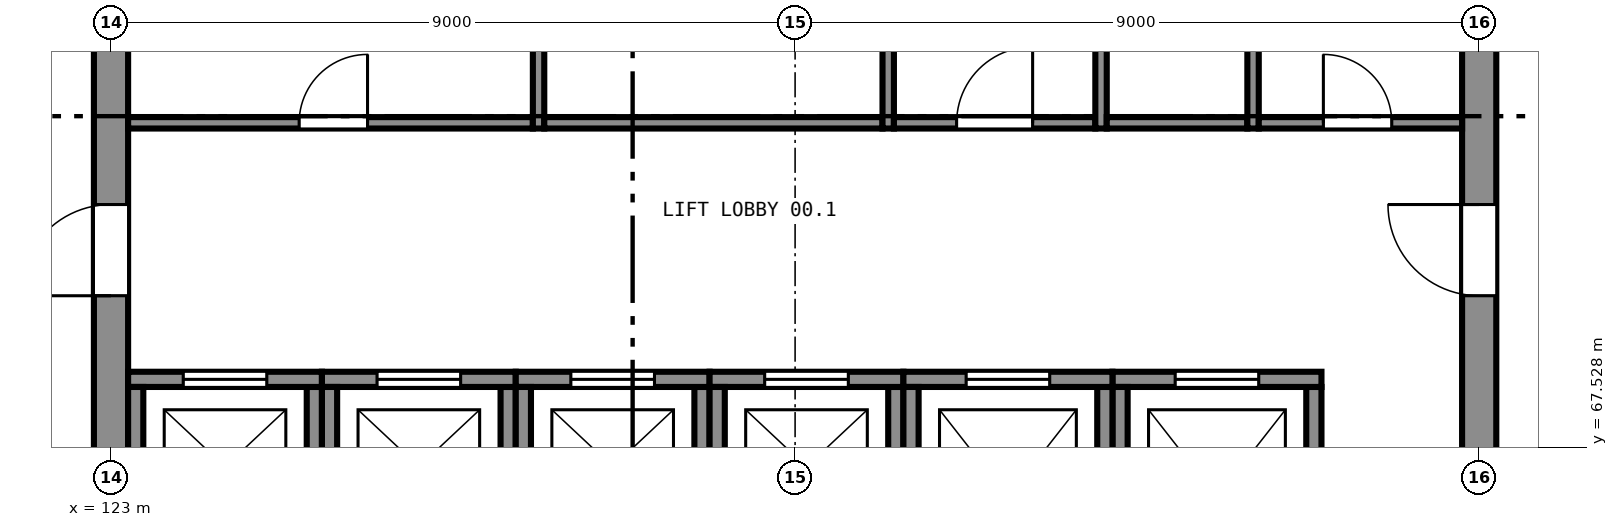
"""IFC4 building model, lengths in metres.
Left out: names, types, materials, properties, quantities, classifications, styles, units other than length and angle.
Written with IfcOpenShell. Run it as: python <this file> out.ifc"""

import sys

from ifc_helpers import new_model, si_unit, direction, frame, frame_2d, origin, place, context, subcontext, project, spatial, rectangle, extrude, element, fill, save


model = new_model("IFC4")
c1 = context("Model", 3, precision=1e-05, world=origin(), true_north=direction((0.0, 1.0)))
c2 = subcontext(c1, "Body", "Model", "MODEL_VIEW")
j1 = project(units=[si_unit("LENGTHUNIT", "METRE"), si_unit("PLANEANGLEUNIT", "RADIAN")], contexts=[c1])
p1 = place(None, origin())
s1 = spatial("IfcSite", under=j1, at=p1, CompositionType="ELEMENT")
p2 = place(p1, origin())
s2 = spatial("IfcBuilding", under=s1, at=p2, CompositionType="ELEMENT")
p3 = place(p2, origin())
s3 = spatial("IfcBuildingStorey", under=s2, at=p3, CompositionType="ELEMENT", Elevation=0.0)
p4 = place(p3, frame((141.0, 65.225, 0.0), z_axis=(0.0, 0.0, 1.0), x_axis=(0.0, 1.0, 0.0)))
e1 = element("IfcWall", 1, at=p4, inside=s3, PredefinedType="SHEAR", context=c2, shape_type="SweptSolid", body=[
    extrude(rectangle(XDim=17.55, YDim=0.45, at=frame_2d((8.775, 0.0))), origin(), (0.0, 0.0, 1.0), 5.5),
])
p5 = place(p4, frame((4.3, 0.0, 0.0)))
e2 = element("IfcOpeningElement", 2, at=p5, cuts=e1, PredefinedType="OPENING", context=c2, shape_type="SweptSolid", body=[
    extrude(rectangle(XDim=1.2, YDim=2.1, at=frame_2d((0.6, 1.05))), frame((0.0, 0.235, 0.0), z_axis=(0.0, -1.0, 0.0), x_axis=(1.0, 0.0, 0.0)), (0.0, 0.0, 1.0), 0.47),
])
p6 = place(p4, frame((12.05, 0.0, 0.0)))
e3 = element("IfcOpeningElement", 3, at=p6, cuts=e1, PredefinedType="OPENING", context=c2, shape_type="SweptSolid", body=[
    extrude(rectangle(XDim=1.2, YDim=2.1, at=frame_2d((0.6, 1.05))), frame((0.0, 0.235, 0.0), z_axis=(0.0, -1.0, 0.0), x_axis=(1.0, 0.0, 0.0)), (0.0, 0.0, 1.0), 0.47),
])
p7 = place(p3, frame((123.0, 82.775, 0.0), z_axis=(0.0, 0.0, 1.0), x_axis=(0.0, -1.0, 0.0)))
e4 = element("IfcWall", 4, at=p7, inside=s3, PredefinedType="SHEAR", context=c2, shape_type="SweptSolid", body=[
    extrude(rectangle(XDim=17.55, YDim=0.45, at=frame_2d((8.775, 0.0))), origin(), (0.0, 0.0, 1.0), 5.5),
])
p8 = place(p7, frame((12.05, 0.0, 0.0)))
e5 = element("IfcOpeningElement", 5, at=p8, cuts=e4, PredefinedType="OPENING", context=c2, shape_type="SweptSolid", body=[
    extrude(rectangle(XDim=1.2, YDim=2.1, at=frame_2d((0.6, 1.05))), frame((0.0, 0.235, 0.0), z_axis=(0.0, -1.0, 0.0), x_axis=(1.0, 0.0, 0.0)), (0.0, 0.0, 1.0), 0.47),
])
p9 = place(p7, frame((4.3, 0.0, 0.0)))
e6 = element("IfcOpeningElement", 6, at=p9, cuts=e4, PredefinedType="OPENING", context=c2, shape_type="SweptSolid", body=[
    extrude(rectangle(XDim=1.2, YDim=2.1, at=frame_2d((0.6, 1.05))), frame((0.0, 0.235, 0.0), z_axis=(0.0, -1.0, 0.0), x_axis=(1.0, 0.0, 0.0)), (0.0, 0.0, 1.0), 0.47),
])
p10 = place(p3, frame((125.675, 66.225, 0.0), z_axis=(0.0, 0.0, 1.0), x_axis=(0.0, 1.0, 0.0)))
e7 = element("IfcWall", 7, at=p10, inside=s3, PredefinedType="SHEAR", context=c2, shape_type="SweptSolid", body=[
    extrude(rectangle(XDim=2.1, YDim=0.2, at=frame_2d((1.05, 0.0))), origin(), (0.0, 0.0, 1.0), 5.5),
])
p11 = place(p3, frame((125.775, 68.425, 0.0), z_axis=(0.0, 0.0, 1.0), x_axis=(-1.0, 0.0, 0.0)))
e8 = element("IfcWall", 8, at=p11, inside=s3, PredefinedType="SHEAR", context=c2, shape_type="SweptSolid", body=[
    extrude(rectangle(XDim=2.55, YDim=0.2, at=frame_2d((1.275, 0.0))), origin(), (0.0, 0.0, 1.0), 5.5),
])
p12 = place(p11, frame((0.725, 0.0, 0.0)))
e9 = element("IfcOpeningElement", 9, at=p12, cuts=e8, PredefinedType="OPENING", context=c2, shape_type="SweptSolid", body=[
    extrude(rectangle(XDim=1.1, YDim=2.1, at=frame_2d((0.55, 1.05))), frame((0.0, 0.11, 0.0), z_axis=(0.0, -1.0, 0.0), x_axis=(1.0, 0.0, 0.0)), (0.0, 0.0, 1.0), 0.22),
])
for number, where, z_axis, x_axis in (
    (10, (123.325, 68.325, 0.0), (0.0, 0.0, 1.0), (0.0, -1.0, 0.0)),
    (11, (128.225, 66.225, 0.0), (0.0, 0.0, 1.0), (0.0, 1.0, 0.0)),
):
    element("IfcWall", number, at=place(p3, frame(where, z_axis=z_axis, x_axis=x_axis)), inside=s3, PredefinedType="SHEAR", context=c2, shape_type="SweptSolid", body=[
        extrude(rectangle(XDim=2.1, YDim=0.2, at=frame_2d((1.05, 0.0))), origin(), (0.0, 0.0, 1.0), 5.5),
    ])
p13 = place(p3, frame((128.325, 68.425, 0.0), z_axis=(0.0, 0.0, 1.0), x_axis=(-1.0, 0.0, 0.0)))
e12 = element("IfcWall", 12, at=p13, inside=s3, PredefinedType="SHEAR", context=c2, shape_type="SweptSolid", body=[
    extrude(rectangle(XDim=2.55, YDim=0.2, at=frame_2d((1.275, 0.0))), origin(), (0.0, 0.0, 1.0), 5.5),
])
p14 = place(p13, frame((0.725, 0.0, 0.0)))
e13 = element("IfcOpeningElement", 13, at=p14, cuts=e12, PredefinedType="OPENING", context=c2, shape_type="SweptSolid", body=[
    extrude(rectangle(XDim=1.1, YDim=2.1, at=frame_2d((0.55, 1.05))), frame((0.0, 0.11, 0.0), z_axis=(0.0, -1.0, 0.0), x_axis=(1.0, 0.0, 0.0)), (0.0, 0.0, 1.0), 0.22),
])
for number, where, z_axis, x_axis in (
    (14, (125.875, 68.325, 0.0), (0.0, 0.0, 1.0), (0.0, -1.0, 0.0)),
    (15, (130.775, 66.225, 0.0), (0.0, 0.0, 1.0), (0.0, 1.0, 0.0)),
):
    element("IfcWall", number, at=place(p3, frame(where, z_axis=z_axis, x_axis=x_axis)), inside=s3, PredefinedType="SHEAR", context=c2, shape_type="SweptSolid", body=[
        extrude(rectangle(XDim=2.1, YDim=0.2, at=frame_2d((1.05, 0.0))), origin(), (0.0, 0.0, 1.0), 5.5),
    ])
p15 = place(p3, frame((130.875, 68.425, 0.0), z_axis=(0.0, 0.0, 1.0), x_axis=(-1.0, 0.0, 0.0)))
e16 = element("IfcWall", 16, at=p15, inside=s3, PredefinedType="SHEAR", context=c2, shape_type="SweptSolid", body=[
    extrude(rectangle(XDim=2.55, YDim=0.2, at=frame_2d((1.275, 0.0))), origin(), (0.0, 0.0, 1.0), 5.5),
])
p16 = place(p15, frame((0.725, 0.0, 0.0)))
e17 = element("IfcOpeningElement", 17, at=p16, cuts=e16, PredefinedType="OPENING", context=c2, shape_type="SweptSolid", body=[
    extrude(rectangle(XDim=1.1, YDim=2.1, at=frame_2d((0.55, 1.05))), frame((0.0, 0.11, 0.0), z_axis=(0.0, -1.0, 0.0), x_axis=(1.0, 0.0, 0.0)), (0.0, 0.0, 1.0), 0.22),
])
for number, where, z_axis, x_axis in (
    (18, (128.425, 68.325, 0.0), (0.0, 0.0, 1.0), (0.0, -1.0, 0.0)),
    (19, (133.325, 66.225, 0.0), (0.0, 0.0, 1.0), (0.0, 1.0, 0.0)),
):
    element("IfcWall", number, at=place(p3, frame(where, z_axis=z_axis, x_axis=x_axis)), inside=s3, PredefinedType="SHEAR", context=c2, shape_type="SweptSolid", body=[
        extrude(rectangle(XDim=2.1, YDim=0.2, at=frame_2d((1.05, 0.0))), origin(), (0.0, 0.0, 1.0), 5.5),
    ])
p17 = place(p3, frame((133.425, 68.425, 0.0), z_axis=(0.0, 0.0, 1.0), x_axis=(-1.0, 0.0, 0.0)))
e20 = element("IfcWall", 20, at=p17, inside=s3, PredefinedType="SHEAR", context=c2, shape_type="SweptSolid", body=[
    extrude(rectangle(XDim=2.55, YDim=0.2, at=frame_2d((1.275, 0.0))), origin(), (0.0, 0.0, 1.0), 5.5),
])
p18 = place(p17, frame((0.725, 0.0, 0.0)))
e21 = element("IfcOpeningElement", 21, at=p18, cuts=e20, PredefinedType="OPENING", context=c2, shape_type="SweptSolid", body=[
    extrude(rectangle(XDim=1.1, YDim=2.1, at=frame_2d((0.55, 1.05))), frame((0.0, 0.11, 0.0), z_axis=(0.0, -1.0, 0.0), x_axis=(1.0, 0.0, 0.0)), (0.0, 0.0, 1.0), 0.22),
])
p19 = place(p3, frame((130.975, 68.325, 0.0), z_axis=(0.0, 0.0, 1.0), x_axis=(0.0, -1.0, 0.0)))
e22 = element("IfcWall", 22, at=p19, inside=s3, PredefinedType="SHEAR", context=c2, shape_type="SweptSolid", body=[
    extrude(rectangle(XDim=2.1, YDim=0.2, at=frame_2d((1.05, 0.0))), origin(), (0.0, 0.0, 1.0), 5.5),
])
p20 = place(p3, frame((136.075, 65.425, 0.0), z_axis=(0.0, 0.0, 1.0), x_axis=(0.0, 1.0, 0.0)))
e23 = element("IfcWall", 23, at=p20, inside=s3, PredefinedType="SHEAR", context=c2, shape_type="SweptSolid", body=[
    extrude(rectangle(XDim=2.9, YDim=0.2, at=frame_2d((1.45, 0.0))), origin(), (0.0, 0.0, 1.0), 5.5),
])
p21 = place(p3, frame((136.175, 68.425, 0.0), z_axis=(0.0, 0.0, 1.0), x_axis=(-1.0, 0.0, 0.0)))
e24 = element("IfcWall", 24, at=p21, inside=s3, PredefinedType="SHEAR", context=c2, shape_type="SweptSolid", body=[
    extrude(rectangle(XDim=2.75, YDim=0.2, at=frame_2d((1.375, 0.0))), origin(), (0.0, 0.0, 1.0), 5.5),
])
p22 = place(p21, frame((0.825, 0.0, 0.0)))
e25 = element("IfcOpeningElement", 25, at=p22, cuts=e24, PredefinedType="OPENING", context=c2, shape_type="SweptSolid", body=[
    extrude(rectangle(XDim=1.1, YDim=2.1, at=frame_2d((0.55, 1.05))), frame((0.0, 0.11, 0.0), z_axis=(0.0, -1.0, 0.0), x_axis=(1.0, 0.0, 0.0)), (0.0, 0.0, 1.0), 0.22),
])
for number, where, z_axis, x_axis in (
    (26, (133.525, 68.325, 0.0), (0.0, 0.0, 1.0), (0.0, -1.0, 0.0)),
    (27, (138.825, 65.425, 0.0), (0.0, 0.0, 1.0), (0.0, 1.0, 0.0)),
):
    element("IfcWall", number, at=place(p3, frame(where, z_axis=z_axis, x_axis=x_axis)), inside=s3, PredefinedType="SHEAR", context=c2, shape_type="SweptSolid", body=[
        extrude(rectangle(XDim=2.9, YDim=0.2, at=frame_2d((1.45, 0.0))), origin(), (0.0, 0.0, 1.0), 5.5),
    ])
p23 = place(p3, frame((138.925, 68.425, 0.0), z_axis=(0.0, 0.0, 1.0), x_axis=(-1.0, 0.0, 0.0)))
e28 = element("IfcWall", 28, at=p23, inside=s3, PredefinedType="SHEAR", context=c2, shape_type="SweptSolid", body=[
    extrude(rectangle(XDim=2.75, YDim=0.2, at=frame_2d((1.375, 0.0))), origin(), (0.0, 0.0, 1.0), 5.5),
])
p24 = place(p23, frame((0.825, 0.0, 0.0)))
e29 = element("IfcOpeningElement", 29, at=p24, cuts=e28, PredefinedType="OPENING", context=c2, shape_type="SweptSolid", body=[
    extrude(rectangle(XDim=1.1, YDim=2.1, at=frame_2d((0.55, 1.05))), frame((0.0, 0.11, 0.0), z_axis=(0.0, -1.0, 0.0), x_axis=(1.0, 0.0, 0.0)), (0.0, 0.0, 1.0), 0.22),
])
p25 = place(p3, frame((136.275, 68.325, 0.0), z_axis=(0.0, 0.0, 1.0), x_axis=(0.0, -1.0, 0.0)))
e30 = element("IfcWall", 30, at=p25, inside=s3, PredefinedType="SHEAR", context=c2, shape_type="SweptSolid", body=[
    extrude(rectangle(XDim=2.9, YDim=0.2, at=frame_2d((1.45, 0.0))), origin(), (0.0, 0.0, 1.0), 5.5),
])
p26 = place(p3, frame((128.625, 71.725, 0.0), z_axis=(0.0, 0.0, 1.0), x_axis=(0.0, 1.0, 0.0)))
e31 = element("IfcWall", 31, at=p26, inside=s3, PredefinedType="PARTITIONING", context=c2, shape_type="SweptSolid", body=[
    extrude(rectangle(XDim=4.55, YDim=0.15, at=frame_2d((2.275, 0.0))), origin(), (0.0, 0.0, 1.0), 5.25),
])
p27 = place(p3, frame((123.225, 71.8, 0.0), z_axis=(0.0, 0.0, 1.0), x_axis=(1.0, 0.0, 0.0)))
e32 = element("IfcWall", 32, at=p27, inside=s3, PredefinedType="PARTITIONING", context=c2, shape_type="SweptSolid", body=[
    extrude(rectangle(XDim=5.325, YDim=0.15, at=frame_2d((2.663, 0.0))), origin(), (0.0, 0.0, 1.0), 5.25),
])
p28 = place(p27, frame((2.25, 0.0, 0.0)))
e33 = element("IfcOpeningElement", 33, at=p28, cuts=e32, PredefinedType="OPENING", context=c2, shape_type="SweptSolid", body=[
    extrude(rectangle(XDim=0.9, YDim=2.1, at=frame_2d((0.45, 1.05))), frame((0.0, 0.085, 0.0), z_axis=(0.0, -1.0, 0.0), x_axis=(1.0, 0.0, 0.0)), (0.0, 0.0, 1.0), 0.17),
])
p29 = place(p3, frame((133.225, 71.725, 0.0), z_axis=(0.0, 0.0, 1.0), x_axis=(0.0, 1.0, 0.0)))
e34 = element("IfcWall", 34, at=p29, inside=s3, PredefinedType="PARTITIONING", context=c2, shape_type="SweptSolid", body=[
    extrude(rectangle(XDim=4.55, YDim=0.15, at=frame_2d((2.275, 0.0))), origin(), (0.0, 0.0, 1.0), 5.25),
])
p30 = place(p3, frame((128.7, 71.8, 0.0), z_axis=(0.0, 0.0, 1.0), x_axis=(1.0, 0.0, 0.0)))
e35 = element("IfcWall", 35, at=p30, inside=s3, PredefinedType="PARTITIONING", context=c2, shape_type="SweptSolid", body=[
    extrude(rectangle(XDim=4.45, YDim=0.15, at=frame_2d((2.225, 0.0))), origin(), (0.0, 0.0, 1.0), 5.25),
])
p31 = place(p3, frame((136.025, 71.725, 0.0), z_axis=(0.0, 0.0, 1.0), x_axis=(0.0, 1.0, 0.0)))
e36 = element("IfcWall", 36, at=p31, inside=s3, PredefinedType="PARTITIONING", context=c2, shape_type="SweptSolid", body=[
    extrude(rectangle(XDim=4.55, YDim=0.15, at=frame_2d((2.275, 0.0))), origin(), (0.0, 0.0, 1.0), 5.25),
])
p32 = place(p3, frame((133.3, 71.8, 0.0), z_axis=(0.0, 0.0, 1.0), x_axis=(1.0, 0.0, 0.0)))
e37 = element("IfcWall", 37, at=p32, inside=s3, PredefinedType="PARTITIONING", context=c2, shape_type="SweptSolid", body=[
    extrude(rectangle(XDim=2.65, YDim=0.15, at=frame_2d((1.325, 0.0))), origin(), (0.0, 0.0, 1.0), 5.25),
])
p33 = place(p32, frame((0.825, 0.0, 0.0)))
e38 = element("IfcOpeningElement", 38, at=p33, cuts=e37, PredefinedType="OPENING", context=c2, shape_type="SweptSolid", body=[
    extrude(rectangle(XDim=1.0, YDim=2.1, at=frame_2d((0.5, 1.05))), frame((0.0, 0.085, 0.0), z_axis=(0.0, -1.0, 0.0), x_axis=(1.0, 0.0, 0.0)), (0.0, 0.0, 1.0), 0.17),
])
p34 = place(p3, frame((138.025, 71.725, 0.0), z_axis=(0.0, 0.0, 1.0), x_axis=(0.0, 1.0, 0.0)))
e39 = element("IfcWall", 39, at=p34, inside=s3, PredefinedType="PARTITIONING", context=c2, shape_type="SweptSolid", body=[
    extrude(rectangle(XDim=4.55, YDim=0.15, at=frame_2d((2.275, 0.0))), origin(), (0.0, 0.0, 1.0), 5.25),
])
p35 = place(p3, frame((136.1, 71.8, 0.0), z_axis=(0.0, 0.0, 1.0), x_axis=(1.0, 0.0, 0.0)))
e40 = element("IfcWall", 40, at=p35, inside=s3, PredefinedType="PARTITIONING", context=c2, shape_type="SweptSolid", body=[
    extrude(rectangle(XDim=1.85, YDim=0.15, at=frame_2d((0.925, 0.0))), origin(), (0.0, 0.0, 1.0), 5.25),
])
p36 = place(p3, frame((138.1, 71.8, 0.0), z_axis=(0.0, 0.0, 1.0), x_axis=(1.0, 0.0, 0.0)))
e41 = element("IfcWall", 41, at=p36, inside=s3, PredefinedType="PARTITIONING", context=c2, shape_type="SweptSolid", body=[
    extrude(rectangle(XDim=2.675, YDim=0.15, at=frame_2d((1.337, 0.0))), origin(), (0.0, 0.0, 1.0), 5.25),
])
p37 = place(p36, frame((0.85, 0.0, 0.0)))
e42 = element("IfcOpeningElement", 42, at=p37, cuts=e41, PredefinedType="OPENING", context=c2, shape_type="SweptSolid", body=[
    extrude(rectangle(XDim=0.9, YDim=2.1, at=frame_2d((0.45, 1.05))), frame((0.0, 0.085, 0.0), z_axis=(0.0, -1.0, 0.0), x_axis=(1.0, 0.0, 0.0)), (0.0, 0.0, 1.0), 0.17),
])
p38 = place(p12, origin())
e43 = element("IfcDoor", 43, at=p38, inside=s3, OperationType="SLIDING_TO_LEFT", PredefinedType="DOOR", context=c2, shape_type="SweptSolid", body=[
    extrude(rectangle(XDim=1.1, YDim=2.1, at=frame_2d((0.55, 1.05))), frame((0.0, 0.025, 0.0), z_axis=(0.0, -1.0, 0.0), x_axis=(1.0, 0.0, 0.0)), (0.0, 0.0, 1.0), 0.05),
])
fill(e9, e43)
p39 = place(p14, origin())
e44 = element("IfcDoor", 44, at=p39, inside=s3, OperationType="SLIDING_TO_LEFT", PredefinedType="DOOR", context=c2, shape_type="SweptSolid", body=[
    extrude(rectangle(XDim=1.1, YDim=2.1, at=frame_2d((0.55, 1.05))), frame((0.0, 0.025, 0.0), z_axis=(0.0, -1.0, 0.0), x_axis=(1.0, 0.0, 0.0)), (0.0, 0.0, 1.0), 0.05),
])
fill(e13, e44)
p40 = place(p16, origin())
e45 = element("IfcDoor", 45, at=p40, inside=s3, OperationType="SLIDING_TO_LEFT", PredefinedType="DOOR", context=c2, shape_type="SweptSolid", body=[
    extrude(rectangle(XDim=1.1, YDim=2.1, at=frame_2d((0.55, 1.05))), frame((0.0, 0.025, 0.0), z_axis=(0.0, -1.0, 0.0), x_axis=(1.0, 0.0, 0.0)), (0.0, 0.0, 1.0), 0.05),
])
fill(e17, e45)
p41 = place(p18, origin())
e46 = element("IfcDoor", 46, at=p41, inside=s3, OperationType="SLIDING_TO_LEFT", PredefinedType="DOOR", context=c2, shape_type="SweptSolid", body=[
    extrude(rectangle(XDim=1.1, YDim=2.1, at=frame_2d((0.55, 1.05))), frame((0.0, 0.025, 0.0), z_axis=(0.0, -1.0, 0.0), x_axis=(1.0, 0.0, 0.0)), (0.0, 0.0, 1.0), 0.05),
])
fill(e21, e46)
p42 = place(p22, origin())
e47 = element("IfcDoor", 47, at=p42, inside=s3, OperationType="SLIDING_TO_LEFT", PredefinedType="DOOR", context=c2, shape_type="SweptSolid", body=[
    extrude(rectangle(XDim=1.1, YDim=2.1, at=frame_2d((0.55, 1.05))), frame((0.0, 0.025, 0.0), z_axis=(0.0, -1.0, 0.0), x_axis=(1.0, 0.0, 0.0)), (0.0, 0.0, 1.0), 0.05),
])
fill(e25, e47)
p43 = place(p24, origin())
e48 = element("IfcDoor", 48, at=p43, inside=s3, OperationType="SLIDING_TO_LEFT", PredefinedType="DOOR", context=c2, shape_type="SweptSolid", body=[
    extrude(rectangle(XDim=1.1, YDim=2.1, at=frame_2d((0.55, 1.05))), frame((0.0, 0.025, 0.0), z_axis=(0.0, -1.0, 0.0), x_axis=(1.0, 0.0, 0.0)), (0.0, 0.0, 1.0), 0.05),
])
fill(e29, e48)
p44 = place(p8, frame((1.2, 0.0, 0.0), z_axis=(0.0, 0.0, 1.0), x_axis=(-1.0, 0.0, 0.0)))
e49 = element("IfcDoor", 49, at=p44, inside=s3, OperationType="SINGLE_SWING_RIGHT", PredefinedType="DOOR", context=c2, shape_type="SweptSolid", body=[
    extrude(rectangle(XDim=1.2, YDim=2.1, at=frame_2d((0.6, 1.05))), frame((0.0, 0.025, 0.0), z_axis=(0.0, -1.0, 0.0), x_axis=(1.0, 0.0, 0.0)), (0.0, 0.0, 1.0), 0.05),
])
fill(e5, e49)
p45 = place(p5, origin())
e50 = element("IfcDoor", 50, at=p45, inside=s3, OperationType="SINGLE_SWING_LEFT", PredefinedType="DOOR", context=c2, shape_type="SweptSolid", body=[
    extrude(rectangle(XDim=1.2, YDim=2.1, at=frame_2d((0.6, 1.05))), frame((0.0, 0.025, 0.0), z_axis=(0.0, -1.0, 0.0), x_axis=(1.0, 0.0, 0.0)), (0.0, 0.0, 1.0), 0.05),
])
fill(e2, e50)
p46 = place(p28, origin())
e51 = element("IfcDoor", 51, at=p46, inside=s3, OperationType="SINGLE_SWING_LEFT", PredefinedType="DOOR", context=c2, shape_type="SweptSolid", body=[
    extrude(rectangle(XDim=0.9, YDim=2.1, at=frame_2d((0.45, 1.05))), frame((0.0, 0.025, 0.0), z_axis=(0.0, -1.0, 0.0), x_axis=(1.0, 0.0, 0.0)), (0.0, 0.0, 1.0), 0.05),
])
fill(e33, e51)
p47 = place(p33, origin())
e52 = element("IfcDoor", 52, at=p47, inside=s3, OperationType="SINGLE_SWING_LEFT", PredefinedType="DOOR", context=c2, shape_type="SweptSolid", body=[
    extrude(rectangle(XDim=1.0, YDim=2.1, at=frame_2d((0.5, 1.05))), frame((0.0, 0.025, 0.0), z_axis=(0.0, -1.0, 0.0), x_axis=(1.0, 0.0, 0.0)), (0.0, 0.0, 1.0), 0.05),
])
fill(e38, e52)
p48 = place(p37, origin())
e53 = element("IfcDoor", 53, at=p48, inside=s3, OperationType="SINGLE_SWING_RIGHT", PredefinedType="DOOR", context=c2, shape_type="SweptSolid", body=[
    extrude(rectangle(XDim=0.9, YDim=2.1, at=frame_2d((0.45, 1.05))), frame((0.0, 0.025, 0.0), z_axis=(0.0, -1.0, 0.0), x_axis=(1.0, 0.0, 0.0)), (0.0, 0.0, 1.0), 0.05),
])
fill(e42, e53)
save(model, sys.argv[1])
